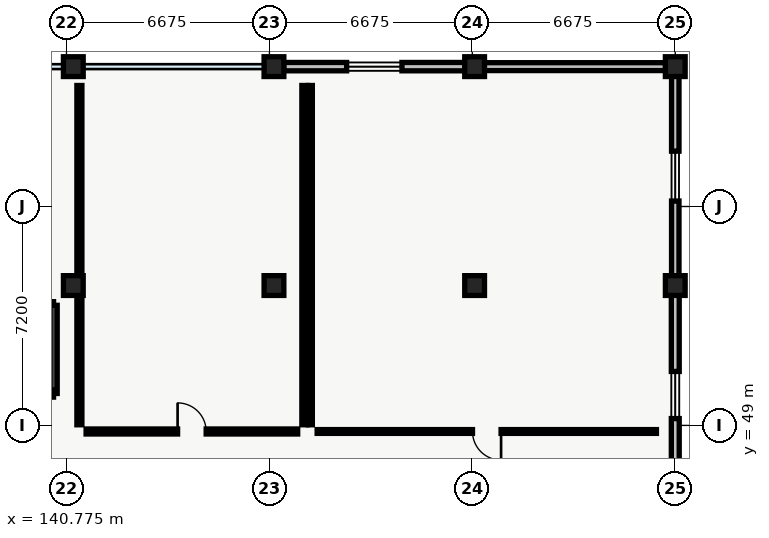
"""IFC4 building model, lengths in metres.
Left out: names, types, materials, properties, quantities, classifications, styles, units other than length and angle.
Written with IfcOpenShell. Run it as: python <this file> out.ifc"""

import sys

from ifc_helpers import new_model, si_unit, direction, frame, frame_2d, origin, origin_2d, place, context, subcontext, project, spatial, rectangle, extrude, element, fill, save


model = new_model("IFC4")
c1 = context("Model", 3, precision=1e-05, world=origin(), true_north=direction((0.0, 1.0)))
c2 = subcontext(c1, "Body", "Model", "MODEL_VIEW")
j1 = project(units=[si_unit("LENGTHUNIT", "METRE"), si_unit("PLANEANGLEUNIT", "RADIAN")], contexts=[c1])
p1 = place(None, origin())
s1 = spatial("IfcSite", under=j1, at=p1, CompositionType="ELEMENT")
p2 = place(p1, origin())
s2 = spatial("IfcBuilding", under=s1, at=p2, CompositionType="ELEMENT")
p3 = place(p2, frame((0.0, 0.0, 14.1)))
s3 = spatial("IfcBuildingStorey", under=s2, at=p3, CompositionType="ELEMENT", Elevation=14.1)
for number, where, z_axis, x_axis in (
    (1, (141.0, 53.6, 0.0), (0.0, 0.0, 1.0), (1.0, 0.0, 0.0)),
    (2, (141.0, 60.8, 0.0), (0.0, 0.0, 1.0), (1.0, 0.0, 0.0)),
    (3, (147.6, 53.6, 0.0), (0.0, 0.0, 1.0), (1.0, 0.0, 0.0)),
    (4, (147.6, 60.8, 0.0), (0.0, 0.0, 1.0), (1.0, 0.0, 0.0)),
    (5, (154.2, 53.6, 0.0), (0.0, 0.0, 1.0), (1.0, 0.0, 0.0)),
    (6, (154.2, 60.8, 0.0), (0.0, 0.0, 1.0), (1.0, 0.0, 0.0)),
    (7, (160.8, 53.6, 0.0), (0.0, 0.0, 1.0), (1.0, 0.0, 0.0)),
    (8, (160.8, 60.8, 0.0), (0.0, 0.0, 1.0), (1.0, 0.0, 0.0)),
):
    element("IfcColumn", number, at=place(p3, frame(where, z_axis=z_axis, x_axis=x_axis)), inside=s3, PredefinedType="COLUMN", context=c2, shape_type="SweptSolid", body=[
        extrude(rectangle(XDim=0.65, YDim=0.65, at=origin_2d()), origin(), (0.0, 0.0, 1.0), 4.29),
    ])
p4 = place(p3, frame((147.92, 60.8, 0.0), z_axis=(0.0, 0.0, 1.0), x_axis=(1.0, 0.0, 0.0)))
e9 = element("IfcWall", 9, at=p4, inside=s3, PredefinedType="STANDARD", context=c2, shape_type="SweptSolid", body=[
    extrude(rectangle(XDim=5.96, YDim=0.275, at=frame_2d((2.98, 0.0))), origin(), (0.0, 0.0, 1.0), 3.775),
])
p5 = place(p4, frame((2.07, 0.0, 0.95)))
e10 = element("IfcOpeningElement", 10, at=p5, cuts=e9, PredefinedType="OPENING", context=c2, shape_type="SweptSolid", body=[
    extrude(rectangle(XDim=1.82, YDim=1.38, at=frame_2d((0.91, 0.69))), frame((0.0, 0.137, 0.0), z_axis=(0.0, -1.0, 0.0), x_axis=(1.0, 0.0, 0.0)), (0.0, 0.0, 1.0), 0.275),
])
p6 = place(p3, frame((154.52, 60.8, 0.0), z_axis=(0.0, 0.0, 1.0), x_axis=(1.0, 0.0, 0.0)))
e11 = element("IfcWall", 11, at=p6, inside=s3, PredefinedType="STANDARD", context=c2, shape_type="SweptSolid", body=[
    extrude(rectangle(XDim=5.96, YDim=0.26, at=frame_2d((2.98, 0.0))), origin(), (0.0, 0.0, 1.0), 3.775),
])
p7 = place(p3, frame((160.8, 60.48, 0.0), z_axis=(0.0, 0.0, 1.0), x_axis=(0.0, -1.0, 0.0)))
e12 = element("IfcWall", 12, at=p7, inside=s3, PredefinedType="STANDARD", context=c2, shape_type="SweptSolid", body=[
    extrude(rectangle(XDim=6.56, YDim=0.245, at=frame_2d((3.28, 0.0))), origin(), (0.0, 0.0, 1.0), 3.775),
])
p8 = place(p7, frame((2.46, 0.0, 0.95)))
e13 = element("IfcOpeningElement", 13, at=p8, cuts=e12, PredefinedType="OPENING", context=c2, shape_type="SweptSolid", body=[
    extrude(rectangle(XDim=1.64, YDim=1.48, at=frame_2d((0.82, 0.74))), frame((0.0, 0.123, 0.0), z_axis=(0.0, -1.0, 0.0), x_axis=(1.0, 0.0, 0.0)), (0.0, 0.0, 1.0), 0.245),
])
p9 = place(p3, frame((160.8, 53.28, 0.0), z_axis=(0.0, 0.0, 1.0), x_axis=(0.0, -1.0, 0.0)))
e14 = element("IfcWall", 14, at=p9, inside=s3, PredefinedType="STANDARD", context=c2, shape_type="SweptSolid", body=[
    extrude(rectangle(XDim=6.56, YDim=0.26, at=frame_2d((3.28, 0.0))), origin(), (0.0, 0.0, 1.0), 3.775),
])
p10 = place(p9, frame((2.505, 0.0, 0.95)))
e15 = element("IfcOpeningElement", 15, at=p10, cuts=e14, PredefinedType="OPENING", context=c2, shape_type="SweptSolid", body=[
    extrude(rectangle(XDim=1.55, YDim=1.46, at=frame_2d((0.775, 0.73))), frame((0.0, 0.13, 0.0), z_axis=(0.0, -1.0, 0.0), x_axis=(1.0, 0.0, 0.0)), (0.0, 0.0, 1.0), 0.26),
])
p11 = place(p3, frame((138.05, 52.95, 0.0), z_axis=(0.0, 0.0, 1.0), x_axis=(1.0, 0.0, 0.0)))
e16 = element("IfcWall", 16, at=p11, inside=s3, PredefinedType="SHEAR", context=c2, shape_type="SweptSolid", body=[
    extrude(rectangle(XDim=2.3, YDim=0.24, at=frame_2d((1.15, 0.0))), origin(), (0.0, 0.0, 1.0), 4.28),
])
p12 = place(p3, frame((140.35, 52.95, 0.0), z_axis=(0.0, 0.0, 1.0), x_axis=(0.0, -1.0, 0.0)))
e17 = element("IfcWall", 17, at=p12, inside=s3, PredefinedType="SHEAR", context=c2, shape_type="SweptSolid", body=[
    extrude(rectangle(XDim=2.9, YDim=0.24, at=frame_2d((1.45, 0.0))), origin(), (0.0, 0.0, 1.0), 4.28),
])
p13 = place(p3, frame((140.35, 50.05, 0.0), z_axis=(0.0, 0.0, 1.0), x_axis=(-1.0, 0.0, 0.0)))
e18 = element("IfcWall", 18, at=p13, inside=s3, PredefinedType="SHEAR", context=c2, shape_type="SweptSolid", body=[
    extrude(rectangle(XDim=2.3, YDim=0.24, at=frame_2d((1.15, 0.0))), origin(), (0.0, 0.0, 1.0), 4.28),
])
p14 = place(p13, frame((0.425, 0.0, 0.0)))
e19 = element("IfcOpeningElement", 19, at=p14, cuts=e18, PredefinedType="OPENING", context=c2, shape_type="SweptSolid", body=[
    extrude(rectangle(XDim=1.45, YDim=2.3, at=frame_2d((0.725, 1.15))), frame((0.0, 0.12, 0.0), z_axis=(0.0, -1.0, 0.0), x_axis=(1.0, 0.0, 0.0)), (0.0, 0.0, 1.0), 0.24),
])
p15 = place(p3, frame((141.42, 48.8, 0.0), z_axis=(0.0, 0.0, 1.0), x_axis=(1.0, 0.0, 0.0)))
e20 = element("IfcWall", 20, at=p15, inside=s3, PredefinedType="PARTITIONING", context=c2, shape_type="SweptSolid", body=[
    extrude(rectangle(XDim=6.96, YDim=0.165, at=frame_2d((3.48, 0.0))), origin(), (0.0, 0.0, 1.0), 3.875),
])
p16 = place(p15, frame((3.01, 0.0, 0.0)))
e21 = element("IfcOpeningElement", 21, at=p16, cuts=e20, PredefinedType="OPENING", context=c2, shape_type="SweptSolid", body=[
    extrude(rectangle(XDim=0.94, YDim=2.1, at=frame_2d((0.47, 1.05))), frame((0.0, 0.083, 0.0), z_axis=(0.0, -1.0, 0.0), x_axis=(1.0, 0.0, 0.0)), (0.0, 0.0, 1.0), 0.165),
])
p17 = place(p3, frame((148.6, 49.02, 0.0), z_axis=(0.0, 0.0, 1.0), x_axis=(0.0, 1.0, 0.0)))
e22 = element("IfcWall", 22, at=p17, inside=s3, PredefinedType="PARTITIONING", context=c2, shape_type="SweptSolid", body=[
    extrude(rectangle(XDim=11.16, YDim=0.165, at=frame_2d((5.58, 0.0))), origin(), (0.0, 0.0, 1.0), 3.95),
])
p18 = place(p3, frame((141.2, 60.18, 0.0), z_axis=(0.0, 0.0, 1.0), x_axis=(0.0, -1.0, 0.0)))
e23 = element("IfcWall", 23, at=p18, inside=s3, PredefinedType="PARTITIONING", context=c2, shape_type="SweptSolid", body=[
    extrude(rectangle(XDim=11.16, YDim=0.165, at=frame_2d((5.58, 0.0))), origin(), (0.0, 0.0, 1.0), 3.675),
])
p19 = place(p3, frame((149.02, 48.8, 0.0), z_axis=(0.0, 0.0, 1.0), x_axis=(1.0, 0.0, 0.0)))
e24 = element("IfcWall", 24, at=p19, inside=s3, PredefinedType="PARTITIONING", context=c2, shape_type="SweptSolid", body=[
    extrude(rectangle(XDim=11.16, YDim=0.125, at=frame_2d((5.58, 0.0))), origin(), (0.0, 0.0, 1.0), 3.875),
])
p20 = place(p19, frame((5.11, 0.0, 0.0)))
e25 = element("IfcOpeningElement", 25, at=p20, cuts=e24, PredefinedType="OPENING", context=c2, shape_type="SweptSolid", body=[
    extrude(rectangle(XDim=0.94, YDim=2.12, at=frame_2d((0.47, 1.06))), frame((0.0, 0.062, 0.0), z_axis=(0.0, -1.0, 0.0), x_axis=(1.0, 0.0, 0.0)), (0.0, 0.0, 1.0), 0.125),
])
p21 = place(p3, frame((148.8, 60.18, 0.0), z_axis=(0.0, 0.0, 1.0), x_axis=(0.0, -1.0, 0.0)))
e26 = element("IfcWall", 26, at=p21, inside=s3, PredefinedType="PARTITIONING", context=c2, shape_type="SweptSolid", body=[
    extrude(rectangle(XDim=11.16, YDim=0.125, at=frame_2d((5.58, 0.0))), origin(), (0.0, 0.0, 1.0), 3.95),
])
p22 = place(p5, origin())
e27 = element("IfcWindow", 27, at=p22, inside=s3, PartitioningType="SINGLE_PANEL", PredefinedType="WINDOW", context=c2, shape_type="SweptSolid", body=[
    extrude(rectangle(XDim=1.82, YDim=1.38, at=frame_2d((0.91, 0.69))), frame((0.0, 0.03, 0.0), z_axis=(0.0, -1.0, 0.0), x_axis=(1.0, 0.0, 0.0)), (0.0, 0.0, 1.0), 0.06),
])
fill(e10, e27)
p23 = place(p8, origin())
e28 = element("IfcWindow", 28, at=p23, inside=s3, PartitioningType="SINGLE_PANEL", PredefinedType="WINDOW", context=c2, shape_type="SweptSolid", body=[
    extrude(rectangle(XDim=1.64, YDim=1.48, at=frame_2d((0.82, 0.74))), frame((0.0, 0.03, 0.0), z_axis=(0.0, -1.0, 0.0), x_axis=(1.0, 0.0, 0.0)), (0.0, 0.0, 1.0), 0.06),
])
fill(e13, e28)
p24 = place(p10, origin())
e29 = element("IfcWindow", 29, at=p24, inside=s3, PartitioningType="SINGLE_PANEL", PredefinedType="WINDOW", context=c2, shape_type="SweptSolid", body=[
    extrude(rectangle(XDim=1.55, YDim=1.46, at=frame_2d((0.775, 0.73))), frame((0.0, 0.03, 0.0), z_axis=(0.0, -1.0, 0.0), x_axis=(1.0, 0.0, 0.0)), (0.0, 0.0, 1.0), 0.06),
])
fill(e15, e29)
p25 = place(p16, origin())
e30 = element("IfcDoor", 30, at=p25, inside=s3, OperationType="SINGLE_SWING_LEFT", PredefinedType="DOOR", context=c2, shape_type="SweptSolid", body=[
    extrude(rectangle(XDim=0.94, YDim=2.1, at=frame_2d((0.47, 1.05))), frame((0.0, 0.025, 0.0), z_axis=(0.0, -1.0, 0.0), x_axis=(1.0, 0.0, 0.0)), (0.0, 0.0, 1.0), 0.05),
])
fill(e21, e30)
p26 = place(p20, origin())
e31 = element("IfcDoor", 31, at=p26, inside=s3, OperationType="SINGLE_SWING_RIGHT", PredefinedType="DOOR", context=c2, shape_type="SweptSolid", body=[
    extrude(rectangle(XDim=0.94, YDim=2.12, at=frame_2d((0.47, 1.06))), frame((0.0, 0.025, 0.0), z_axis=(0.0, -1.0, 0.0), x_axis=(1.0, 0.0, 0.0)), (0.0, 0.0, 1.0), 0.05),
])
fill(e25, e31)
save(model, sys.argv[1])
